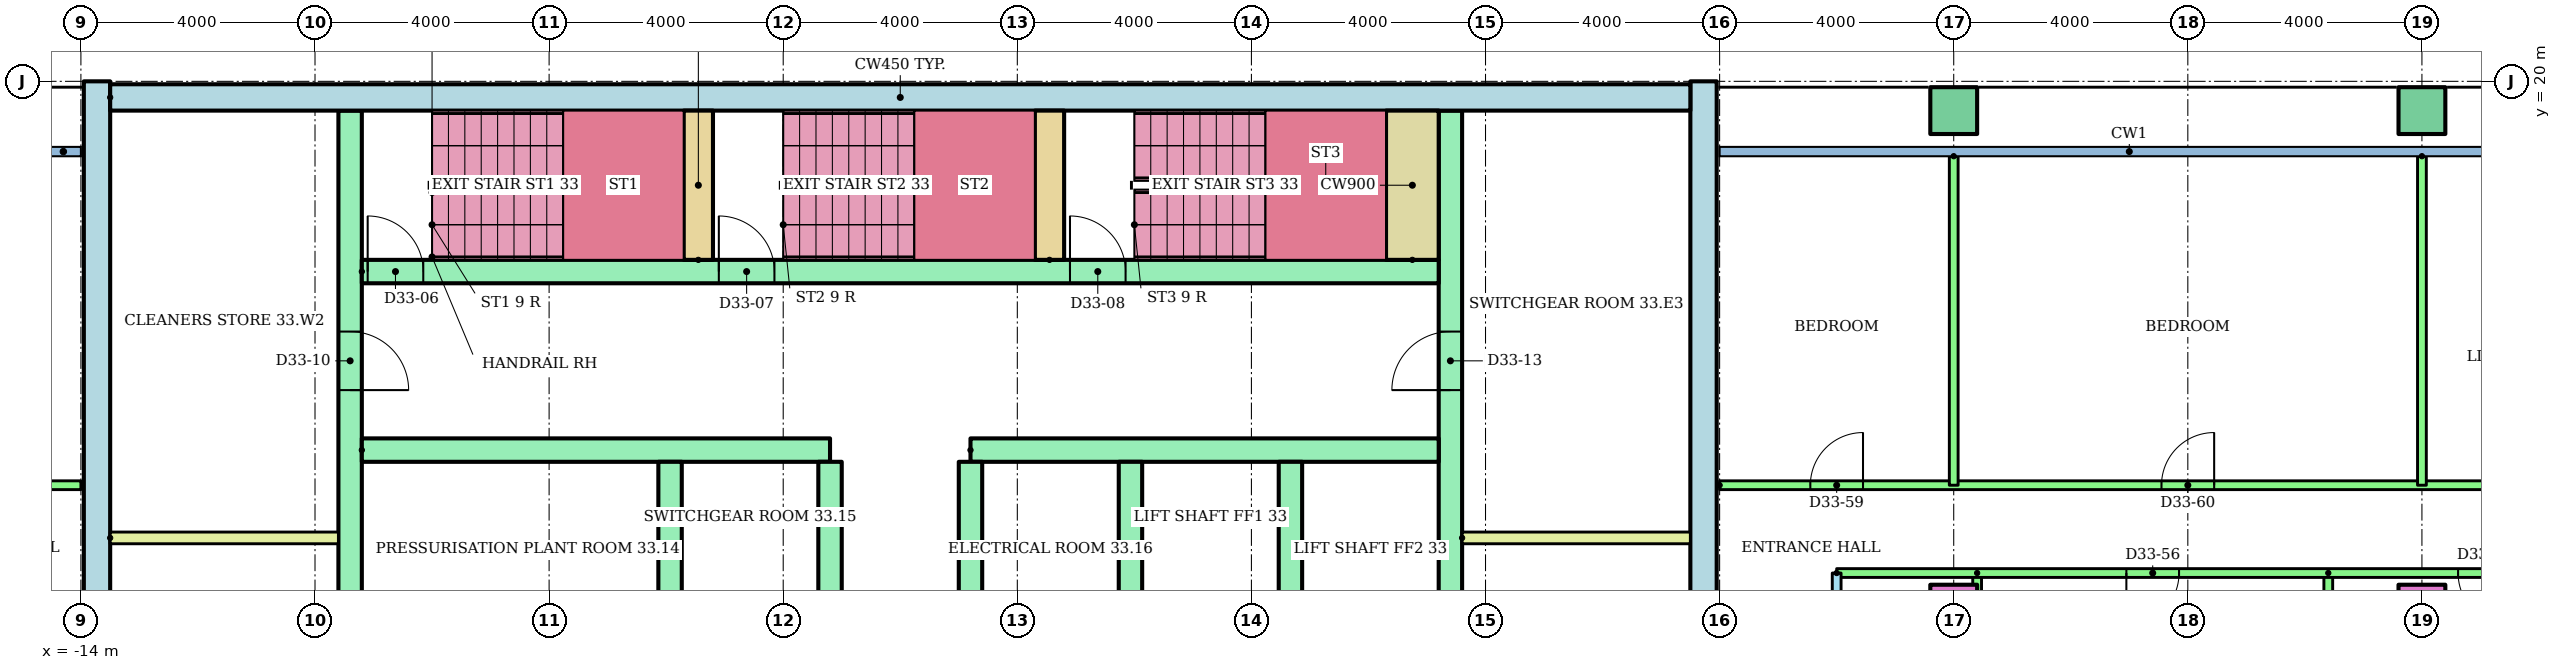
"""IFC4 building model, lengths in metres.
Left out: names, types, materials, properties, quantities, classifications, styles, units other than length and angle.
Written with IfcOpenShell. Run it as: python <this file> out.ifc"""

import sys

from ifc_helpers import new_model, si_unit, direction, frame, frame_2d, origin, origin_2d, place, context, subcontext, project, spatial, rectangle, hollow_rectangle, extrude, element, fill, save


model = new_model("IFC4")
c1 = context("Model", 3, precision=1e-05, world=origin(), true_north=direction((0.0, 1.0)))
c2 = subcontext(c1, "Body", "Model", "MODEL_VIEW")
j1 = project(units=[si_unit("LENGTHUNIT", "METRE"), si_unit("PLANEANGLEUNIT", "RADIAN")], contexts=[c1])
p1 = place(None, origin())
s1 = spatial("IfcSite", under=j1, at=p1, CompositionType="ELEMENT")
p2 = place(p1, origin())
s2 = spatial("IfcBuilding", under=s1, at=p2, CompositionType="ELEMENT")
p3 = place(p2, frame((0.0, 0.0, 129.4)))
s3 = spatial("IfcBuildingStorey", under=s2, at=p3, CompositionType="ELEMENT", Elevation=129.4)
for number, where in (
    (1, (18.0, 11.0, 0.0)),
    (2, (26.0, 11.0, 0.0)),
):
    element("IfcColumn", number, at=place(p3, frame(where)), inside=s3, PredefinedType="COLUMN", context=c2, shape_type="SweptSolid", body=[
        extrude(rectangle(XDim=0.8, YDim=0.8, at=origin_2d()), origin(), (0.0, 0.0, 1.0), 3.2),
    ])
for number, where in (
    (3, (18.0, 19.5, 0.0)),
    (4, (26.0, 19.5, 0.0)),
):
    element("IfcColumn", number, at=place(p3, frame(where)), inside=s3, PredefinedType="COLUMN", context=c2, shape_type="SweptSolid", body=[
        extrude(hollow_rectangle(XDim=0.8, YDim=0.8, WallThickness=0.04, at=origin_2d()), origin(), (0.0, 0.0, 1.0), 3.2),
    ])
for number, where, z_axis, x_axis in (
    (5, (-13.725, 3.0, 0.0), (0.0, 0.0, 1.0), (0.0, 1.0, 0.0)),
    (6, (13.725, 3.0, 0.0), (0.0, 0.0, 1.0), (0.0, 1.0, 0.0)),
):
    element("IfcWall", number, at=place(p3, frame(where, z_axis=z_axis, x_axis=x_axis)), inside=s3, PredefinedType="SHEAR", context=c2, shape_type="SweptSolid", body=[
        extrude(rectangle(XDim=17.0, YDim=0.45, at=frame_2d((8.5, 0.0))), origin(), (0.0, 0.0, 1.0), 2.92),
    ])
p4 = place(p3, frame((-13.5, 19.725, 0.0)))
e7 = element("IfcWall", 7, at=p4, inside=s3, PredefinedType="SHEAR", context=c2, shape_type="SweptSolid", body=[
    extrude(rectangle(XDim=27.0, YDim=0.45, at=frame_2d((13.5, 0.0))), origin(), (0.0, 0.0, 1.0), 2.92),
])
p5 = place(p3, frame((-9.4, 6.8, 0.0), z_axis=(0.0, 0.0, 1.0), x_axis=(0.0, 1.0, 0.0)))
e8 = element("IfcWall", 8, at=p5, inside=s3, PredefinedType="SHEAR", context=c2, shape_type="SweptSolid", body=[
    extrude(rectangle(XDim=12.7, YDim=0.4, at=frame_2d((6.35, 0.0))), origin(), (0.0, 0.0, 1.0), 2.92),
])
p6 = place(p5, frame((1.15, 0.0, 0.0)))
e9 = element("IfcOpeningElement", 9, at=p6, cuts=e8, PredefinedType="OPENING", context=c2, shape_type="SweptSolid", body=[
    extrude(rectangle(XDim=1.0, YDim=2.1, at=frame_2d((0.5, 1.05))), frame((0.0, 0.21, 0.0), z_axis=(0.0, -1.0, 0.0), x_axis=(1.0, 0.0, 0.0)), (0.0, 0.0, 1.0), 0.42),
])
p7 = place(p5, frame((7.925, 0.0, 0.0)))
e10 = element("IfcOpeningElement", 10, at=p7, cuts=e8, PredefinedType="OPENING", context=c2, shape_type="SweptSolid", body=[
    extrude(rectangle(XDim=1.0, YDim=2.1, at=frame_2d((0.5, 1.05))), frame((0.0, 0.21, 0.0), z_axis=(0.0, -1.0, 0.0), x_axis=(1.0, 0.0, 0.0)), (0.0, 0.0, 1.0), 0.42),
])
p8 = place(p3, frame((9.4, 6.8, 0.0), z_axis=(0.0, 0.0, 1.0), x_axis=(0.0, 1.0, 0.0)))
e11 = element("IfcWall", 11, at=p8, inside=s3, PredefinedType="SHEAR", context=c2, shape_type="SweptSolid", body=[
    extrude(rectangle(XDim=12.7, YDim=0.4, at=frame_2d((6.35, 0.0))), origin(), (0.0, 0.0, 1.0), 2.92),
])
p9 = place(p8, frame((0.3, 0.0, 0.0)))
e12 = element("IfcOpeningElement", 12, at=p9, cuts=e11, PredefinedType="OPENING", context=c2, shape_type="SweptSolid", body=[
    extrude(rectangle(XDim=1.0, YDim=2.1, at=frame_2d((0.5, 1.05))), frame((0.0, 0.21, 0.0), z_axis=(0.0, -1.0, 0.0), x_axis=(1.0, 0.0, 0.0)), (0.0, 0.0, 1.0), 0.42),
])
p10 = place(p8, frame((2.05, 0.0, 0.0)))
e13 = element("IfcOpeningElement", 13, at=p10, cuts=e11, PredefinedType="OPENING", context=c2, shape_type="SweptSolid", body=[
    extrude(rectangle(XDim=1.0, YDim=2.1, at=frame_2d((0.5, 1.05))), frame((0.0, 0.21, 0.0), z_axis=(0.0, -1.0, 0.0), x_axis=(1.0, 0.0, 0.0)), (0.0, 0.0, 1.0), 0.42),
])
p11 = place(p8, frame((7.925, 0.0, 0.0)))
e14 = element("IfcOpeningElement", 14, at=p11, cuts=e11, PredefinedType="OPENING", context=c2, shape_type="SweptSolid", body=[
    extrude(rectangle(XDim=1.0, YDim=2.1, at=frame_2d((0.5, 1.05))), frame((0.0, 0.21, 0.0), z_axis=(0.0, -1.0, 0.0), x_axis=(1.0, 0.0, 0.0)), (0.0, 0.0, 1.0), 0.42),
])
for number, where in (
    (15, (-9.2, 13.7, 0.0)),
    (16, (1.2, 13.7, 0.0)),
):
    element("IfcWall", number, at=place(p3, frame(where)), inside=s3, PredefinedType="SHEAR", context=c2, shape_type="SweptSolid", body=[
        extrude(rectangle(XDim=8.0, YDim=0.4, at=frame_2d((4.0, 0.0))), origin(), (0.0, 0.0, 1.0), 2.92),
    ])
for number, where, z_axis, x_axis in (
    (17, (-3.933, 10.5, 0.0), (0.0, 0.0, 1.0), (0.0, 1.0, 0.0)),
    (18, (-1.2, 10.5, 0.0), (0.0, 0.0, 1.0), (0.0, 1.0, 0.0)),
    (19, (1.2, 10.5, 0.0), (0.0, 0.0, 1.0), (0.0, 1.0, 0.0)),
    (20, (3.933, 10.5, 0.0), (0.0, 0.0, 1.0), (0.0, 1.0, 0.0)),
    (21, (6.667, 10.5, 0.0), (0.0, 0.0, 1.0), (0.0, 1.0, 0.0)),
):
    element("IfcWall", number, at=place(p3, frame(where, z_axis=z_axis, x_axis=x_axis)), inside=s3, PredefinedType="SHEAR", context=c2, shape_type="SweptSolid", body=[
        extrude(rectangle(XDim=3.0, YDim=0.4, at=frame_2d((1.5, 0.0))), origin(), (0.0, 0.0, 1.0), 2.92),
    ])
p12 = place(p3, frame((-9.2, 16.75, 0.0)))
e22 = element("IfcWall", 22, at=p12, inside=s3, PredefinedType="SHEAR", context=c2, shape_type="SweptSolid", body=[
    extrude(rectangle(XDim=18.4, YDim=0.4, at=frame_2d((9.2, 0.0))), origin(), (0.0, 0.0, 1.0), 2.92),
])
p13 = place(p12, frame((0.1, 0.0, 0.0)))
e23 = element("IfcOpeningElement", 23, at=p13, cuts=e22, PredefinedType="OPENING", context=c2, shape_type="SweptSolid", body=[
    extrude(rectangle(XDim=0.95, YDim=2.1, at=frame_2d((0.475, 1.05))), frame((0.0, 0.21, 0.0), z_axis=(0.0, -1.0, 0.0), x_axis=(1.0, 0.0, 0.0)), (0.0, 0.0, 1.0), 0.42),
])
p14 = place(p12, frame((6.1, 0.0, 0.0)))
e24 = element("IfcOpeningElement", 24, at=p14, cuts=e22, PredefinedType="OPENING", context=c2, shape_type="SweptSolid", body=[
    extrude(rectangle(XDim=0.95, YDim=2.1, at=frame_2d((0.475, 1.05))), frame((0.0, 0.21, 0.0), z_axis=(0.0, -1.0, 0.0), x_axis=(1.0, 0.0, 0.0)), (0.0, 0.0, 1.0), 0.42),
])
p15 = place(p12, frame((12.1, 0.0, 0.0)))
e25 = element("IfcOpeningElement", 25, at=p15, cuts=e22, PredefinedType="OPENING", context=c2, shape_type="SweptSolid", body=[
    extrude(rectangle(XDim=0.95, YDim=2.1, at=frame_2d((0.475, 1.05))), frame((0.0, 0.21, 0.0), z_axis=(0.0, -1.0, 0.0), x_axis=(1.0, 0.0, 0.0)), (0.0, 0.0, 1.0), 0.42),
])
for number, where, z_axis, x_axis in (
    (26, (-3.45, 16.95, 0.0), (0.0, 0.0, 1.0), (0.0, 1.0, 0.0)),
    (27, (2.55, 16.95, 0.0), (0.0, 0.0, 1.0), (0.0, 1.0, 0.0)),
):
    element("IfcWall", number, at=place(p3, frame(where, z_axis=z_axis, x_axis=x_axis)), inside=s3, PredefinedType="SHEAR", context=c2, shape_type="SweptSolid", body=[
        extrude(rectangle(XDim=2.55, YDim=0.5, at=frame_2d((1.275, 0.0))), origin(), (0.0, 0.0, 1.0), 2.92),
    ])
p16 = place(p3, frame((8.75, 16.95, 0.0), z_axis=(0.0, 0.0, 1.0), x_axis=(0.0, 1.0, 0.0)))
e28 = element("IfcWall", 28, at=p16, inside=s3, PredefinedType="SHEAR", context=c2, shape_type="SweptSolid", body=[
    extrude(rectangle(XDim=2.55, YDim=0.9, at=frame_2d((1.275, 0.0))), origin(), (0.0, 0.0, 1.0), 2.92),
])
for number, where in (
    (29, (-13.5, 12.2, 0.0)),
    (30, (9.6, 12.2, 0.0)),
):
    element("IfcWall", number, at=place(p3, frame(where)), inside=s3, PredefinedType="PARTITIONING", context=c2, shape_type="SweptSolid", body=[
        extrude(rectangle(XDim=3.9, YDim=0.2, at=frame_2d((1.95, 0.0))), origin(), (0.0, 0.0, 1.0), 2.92),
    ])
p17 = place(p3, frame((-32.72, 13.1, 0.0)))
e31 = element("IfcWall", 31, at=p17, inside=s3, PredefinedType="PARTITIONING", context=c2, shape_type="SweptSolid", body=[
    extrude(rectangle(XDim=18.72, YDim=0.15, at=frame_2d((9.36, 0.0))), origin(), (0.0, 0.0, 1.0), 2.4),
])
p18 = place(p17, frame((2.02, 0.0, 0.0)))
e32 = element("IfcOpeningElement", 32, at=p18, cuts=e31, PredefinedType="OPENING", context=c2, shape_type="SweptSolid", body=[
    extrude(rectangle(XDim=0.9, YDim=2.1, at=frame_2d((0.45, 1.05))), frame((0.0, 0.085, 0.0), z_axis=(0.0, -1.0, 0.0), x_axis=(1.0, 0.0, 0.0)), (0.0, 0.0, 1.0), 0.17),
])
p19 = place(p17, frame((7.47, 0.0, 0.0)))
e33 = element("IfcOpeningElement", 33, at=p19, cuts=e31, PredefinedType="OPENING", context=c2, shape_type="SweptSolid", body=[
    extrude(rectangle(XDim=0.9, YDim=2.1, at=frame_2d((0.45, 1.05))), frame((0.0, 0.085, 0.0), z_axis=(0.0, -1.0, 0.0), x_axis=(1.0, 0.0, 0.0)), (0.0, 0.0, 1.0), 0.17),
])
p20 = place(p17, frame((14.22, 0.0, 0.0)))
e34 = element("IfcOpeningElement", 34, at=p20, cuts=e31, PredefinedType="OPENING", context=c2, shape_type="SweptSolid", body=[
    extrude(rectangle(XDim=1.0, YDim=2.1, at=frame_2d((0.5, 1.05))), frame((0.0, 0.085, 0.0), z_axis=(0.0, -1.0, 0.0), x_axis=(1.0, 0.0, 0.0)), (0.0, 0.0, 1.0), 0.17),
])
p21 = place(p3, frame((16.0, 11.6, 0.0), z_axis=(0.0, 0.0, 1.0), x_axis=(0.0, -1.0, 0.0)))
e35 = element("IfcWall", 35, at=p21, inside=s3, PredefinedType="PARTITIONING", context=c2, shape_type="SweptSolid", body=[
    extrude(rectangle(XDim=10.2, YDim=0.15, at=frame_2d((5.1, 0.0))), origin(), (0.0, 0.0, 1.0), 2.4),
])
p22 = place(p21, frame((7.0, 0.0, 0.0)))
e36 = element("IfcOpeningElement", 36, at=p22, cuts=e35, PredefinedType="OPENING", context=c2, shape_type="SweptSolid", body=[
    extrude(rectangle(XDim=0.9, YDim=2.1, at=frame_2d((0.45, 1.05))), frame((0.0, 0.085, 0.0), z_axis=(0.0, -1.0, 0.0), x_axis=(1.0, 0.0, 0.0)), (0.0, 0.0, 1.0), 0.17),
])
p23 = place(p21, frame((1.95, 0.0, 0.0)))
e37 = element("IfcOpeningElement", 37, at=p23, cuts=e35, PredefinedType="OPENING", context=c2, shape_type="SweptSolid", body=[
    extrude(rectangle(XDim=0.8, YDim=2.1, at=frame_2d((0.4, 1.05))), frame((0.0, 0.085, 0.0), z_axis=(0.0, -1.0, 0.0), x_axis=(1.0, 0.0, 0.0)), (0.0, 0.0, 1.0), 0.17),
])
for number, where, z_axis, x_axis in (
    (38, (18.4, 11.6, 0.0), (0.0, 0.0, 1.0), (0.0, -1.0, 0.0)),
    (39, (24.4, 11.6, 0.0), (0.0, 0.0, 1.0), (0.0, -1.0, 0.0)),
):
    element("IfcWall", number, at=place(p3, frame(where, z_axis=z_axis, x_axis=x_axis)), inside=s3, PredefinedType="PARTITIONING", context=c2, shape_type="SweptSolid", body=[
        extrude(rectangle(XDim=10.2, YDim=0.15, at=frame_2d((5.1, 0.0))), origin(), (0.0, 0.0, 1.0), 2.4),
    ])
p24 = place(p3, frame((32.72, 11.6, 0.0), z_axis=(0.0, 0.0, 1.0), x_axis=(-1.0, 0.0, 0.0)))
e40 = element("IfcWall", 40, at=p24, inside=s3, PredefinedType="PARTITIONING", context=c2, shape_type="SweptSolid", body=[
    extrude(rectangle(XDim=16.72, YDim=0.15, at=frame_2d((8.36, 0.0))), origin(), (0.0, 0.0, 1.0), 2.4),
])
p25 = place(p24, frame((10.87, 0.0, 0.0)))
e41 = element("IfcOpeningElement", 41, at=p25, cuts=e40, PredefinedType="OPENING", context=c2, shape_type="SweptSolid", body=[
    extrude(rectangle(XDim=0.9, YDim=2.1, at=frame_2d((0.45, 1.05))), frame((0.0, 0.085, 0.0), z_axis=(0.0, -1.0, 0.0), x_axis=(1.0, 0.0, 0.0)), (0.0, 0.0, 1.0), 0.17),
])
p26 = place(p24, frame((5.202, 0.0, 0.0)))
e42 = element("IfcOpeningElement", 42, at=p26, cuts=e40, PredefinedType="OPENING", context=c2, shape_type="SweptSolid", body=[
    extrude(rectangle(XDim=0.9, YDim=2.1, at=frame_2d((0.45, 1.05))), frame((0.0, 0.085, 0.0), z_axis=(0.0, -1.0, 0.0), x_axis=(1.0, 0.0, 0.0)), (0.0, 0.0, 1.0), 0.17),
])
p27 = place(p24, frame((1.445, 0.0, 0.0)))
e43 = element("IfcOpeningElement", 43, at=p27, cuts=e40, PredefinedType="OPENING", context=c2, shape_type="SweptSolid", body=[
    extrude(rectangle(XDim=0.9, YDim=2.1, at=frame_2d((0.45, 1.05))), frame((0.0, 0.085, 0.0), z_axis=(0.0, -1.0, 0.0), x_axis=(1.0, 0.0, 0.0)), (0.0, 0.0, 1.0), 0.17),
])
p28 = place(p3, frame((14.0, 13.1, 0.0)))
e44 = element("IfcWall", 44, at=p28, inside=s3, PredefinedType="PARTITIONING", context=c2, shape_type="SweptSolid", body=[
    extrude(rectangle(XDim=18.72, YDim=0.15, at=frame_2d((9.36, 0.0))), origin(), (0.0, 0.0, 1.0), 2.4),
])
p29 = place(p28, frame((1.55, 0.0, 0.0)))
e45 = element("IfcOpeningElement", 45, at=p29, cuts=e44, PredefinedType="OPENING", context=c2, shape_type="SweptSolid", body=[
    extrude(rectangle(XDim=0.9, YDim=2.1, at=frame_2d((0.45, 1.05))), frame((0.0, 0.085, 0.0), z_axis=(0.0, -1.0, 0.0), x_axis=(1.0, 0.0, 0.0)), (0.0, 0.0, 1.0), 0.17),
])
p30 = place(p28, frame((7.55, 0.0, 0.0)))
e46 = element("IfcOpeningElement", 46, at=p30, cuts=e44, PredefinedType="OPENING", context=c2, shape_type="SweptSolid", body=[
    extrude(rectangle(XDim=0.9, YDim=2.1, at=frame_2d((0.45, 1.05))), frame((0.0, 0.085, 0.0), z_axis=(0.0, -1.0, 0.0), x_axis=(1.0, 0.0, 0.0)), (0.0, 0.0, 1.0), 0.17),
])
p31 = place(p28, frame((14.75, 0.0, 0.0)))
e47 = element("IfcOpeningElement", 47, at=p31, cuts=e44, PredefinedType="OPENING", context=c2, shape_type="SweptSolid", body=[
    extrude(rectangle(XDim=1.0, YDim=2.1, at=frame_2d((0.5, 1.05))), frame((0.0, 0.085, 0.0), z_axis=(0.0, -1.0, 0.0), x_axis=(1.0, 0.0, 0.0)), (0.0, 0.0, 1.0), 0.17),
])
for number, where, z_axis, x_axis in (
    (48, (18.0, 18.721, 0.0), (0.0, 0.0, 1.0), (0.0, -1.0, 0.0)),
    (49, (26.0, 18.721, 0.0), (0.0, 0.0, 1.0), (0.0, -1.0, 0.0)),
):
    element("IfcWall", number, at=place(p3, frame(where, z_axis=z_axis, x_axis=x_axis)), inside=s3, PredefinedType="PARTITIONING", context=c2, shape_type="SweptSolid", body=[
        extrude(rectangle(XDim=5.621, YDim=0.15, at=frame_2d((2.811, 0.0))), origin(), (0.0, 0.0, 1.0), 2.4),
    ])
p32 = place(p13, origin())
e50 = element("IfcDoor", 50, at=p32, inside=s3, OperationType="SINGLE_SWING_LEFT", PredefinedType="DOOR", context=c2, shape_type="SweptSolid", body=[
    extrude(rectangle(XDim=0.95, YDim=2.1, at=frame_2d((0.475, 1.05))), frame((0.0, 0.025, 0.0), z_axis=(0.0, -1.0, 0.0), x_axis=(1.0, 0.0, 0.0)), (0.0, 0.0, 1.0), 0.05),
])
fill(e23, e50)
p33 = place(p14, origin())
e51 = element("IfcDoor", 51, at=p33, inside=s3, OperationType="SINGLE_SWING_LEFT", PredefinedType="DOOR", context=c2, shape_type="SweptSolid", body=[
    extrude(rectangle(XDim=0.95, YDim=2.1, at=frame_2d((0.475, 1.05))), frame((0.0, 0.025, 0.0), z_axis=(0.0, -1.0, 0.0), x_axis=(1.0, 0.0, 0.0)), (0.0, 0.0, 1.0), 0.05),
])
fill(e24, e51)
p34 = place(p15, origin())
e52 = element("IfcDoor", 52, at=p34, inside=s3, OperationType="SINGLE_SWING_LEFT", PredefinedType="DOOR", context=c2, shape_type="SweptSolid", body=[
    extrude(rectangle(XDim=0.95, YDim=2.1, at=frame_2d((0.475, 1.05))), frame((0.0, 0.025, 0.0), z_axis=(0.0, -1.0, 0.0), x_axis=(1.0, 0.0, 0.0)), (0.0, 0.0, 1.0), 0.05),
])
fill(e25, e52)
p35 = place(p7, frame((1.0, 0.0, 0.0), z_axis=(0.0, 0.0, 1.0), x_axis=(-1.0, 0.0, 0.0)))
e53 = element("IfcDoor", 53, at=p35, inside=s3, OperationType="SINGLE_SWING_LEFT", PredefinedType="DOOR", context=c2, shape_type="SweptSolid", body=[
    extrude(rectangle(XDim=1.0, YDim=2.1, at=frame_2d((0.5, 1.05))), frame((0.0, 0.025, 0.0), z_axis=(0.0, -1.0, 0.0), x_axis=(1.0, 0.0, 0.0)), (0.0, 0.0, 1.0), 0.05),
])
fill(e10, e53)
p36 = place(p11, origin())
e54 = element("IfcDoor", 54, at=p36, inside=s3, OperationType="SINGLE_SWING_LEFT", PredefinedType="DOOR", context=c2, shape_type="SweptSolid", body=[
    extrude(rectangle(XDim=1.0, YDim=2.1, at=frame_2d((0.5, 1.05))), frame((0.0, 0.025, 0.0), z_axis=(0.0, -1.0, 0.0), x_axis=(1.0, 0.0, 0.0)), (0.0, 0.0, 1.0), 0.05),
])
fill(e14, e54)
p37 = place(p25, origin())
e55 = element("IfcDoor", 55, at=p37, inside=s3, OperationType="SINGLE_SWING_RIGHT", PredefinedType="DOOR", context=c2, shape_type="SweptSolid", body=[
    extrude(rectangle(XDim=0.9, YDim=2.1, at=frame_2d((0.45, 1.05))), frame((0.0, 0.025, 0.0), z_axis=(0.0, -1.0, 0.0), x_axis=(1.0, 0.0, 0.0)), (0.0, 0.0, 1.0), 0.05),
])
fill(e41, e55)
p38 = place(p26, origin())
e56 = element("IfcDoor", 56, at=p38, inside=s3, OperationType="SINGLE_SWING_LEFT", PredefinedType="DOOR", context=c2, shape_type="SweptSolid", body=[
    extrude(rectangle(XDim=0.9, YDim=2.1, at=frame_2d((0.45, 1.05))), frame((0.0, 0.025, 0.0), z_axis=(0.0, -1.0, 0.0), x_axis=(1.0, 0.0, 0.0)), (0.0, 0.0, 1.0), 0.05),
])
fill(e42, e56)
p39 = place(p29, origin())
e57 = element("IfcDoor", 57, at=p39, inside=s3, OperationType="SINGLE_SWING_RIGHT", PredefinedType="DOOR", context=c2, shape_type="SweptSolid", body=[
    extrude(rectangle(XDim=0.9, YDim=2.1, at=frame_2d((0.45, 1.05))), frame((0.0, 0.025, 0.0), z_axis=(0.0, -1.0, 0.0), x_axis=(1.0, 0.0, 0.0)), (0.0, 0.0, 1.0), 0.05),
])
fill(e45, e57)
p40 = place(p30, origin())
e58 = element("IfcDoor", 58, at=p40, inside=s3, OperationType="SINGLE_SWING_RIGHT", PredefinedType="DOOR", context=c2, shape_type="SweptSolid", body=[
    extrude(rectangle(XDim=0.9, YDim=2.1, at=frame_2d((0.45, 1.05))), frame((0.0, 0.025, 0.0), z_axis=(0.0, -1.0, 0.0), x_axis=(1.0, 0.0, 0.0)), (0.0, 0.0, 1.0), 0.05),
])
fill(e46, e58)
save(model, sys.argv[1])
